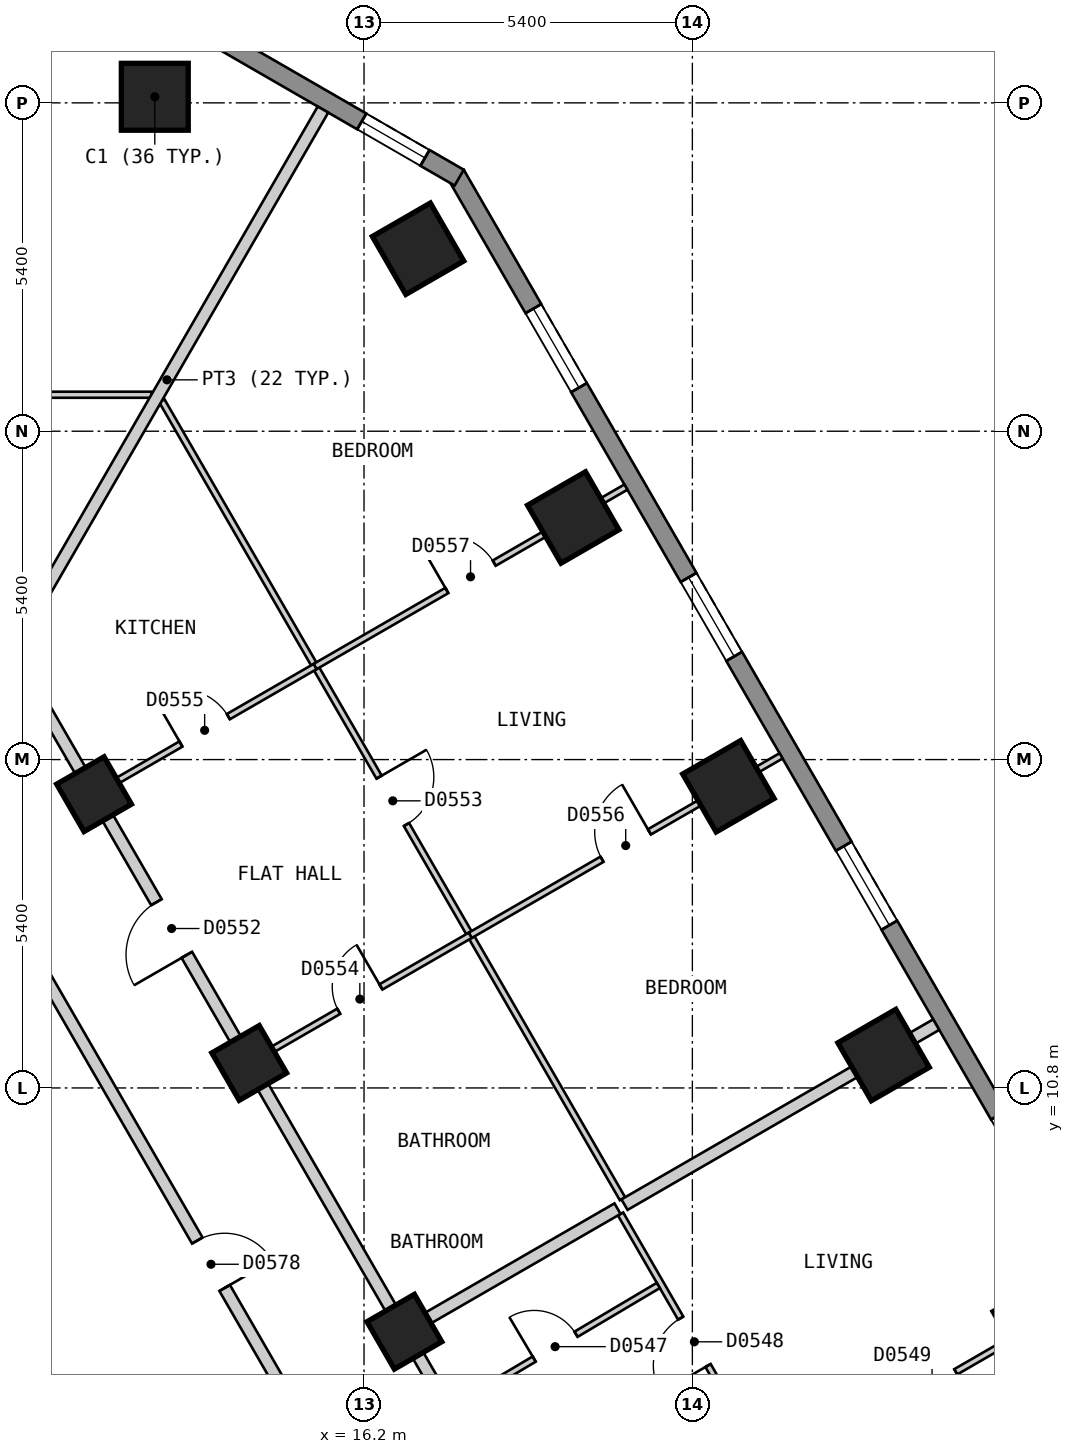
"""IFC4 building model, lengths in metres.
Left out: names, types, materials, properties, quantities, classifications, styles, units other than length and angle.
Written with IfcOpenShell. Run it as: python <this file> out.ifc"""

import sys

from ifc_helpers import new_model, si_unit, direction, frame, frame_2d, origin, origin_2d, place, context, subcontext, project, spatial, polyline, rectangle, outline, extrude, element, fill, save


model = new_model("IFC4")
c1 = context("Model", 3, precision=1e-05, world=origin(), true_north=direction((0.0, 1.0)))
c2 = subcontext(c1, "Body", "Model", "MODEL_VIEW")
j1 = project(units=[si_unit("LENGTHUNIT", "METRE"), si_unit("PLANEANGLEUNIT", "RADIAN")], contexts=[c1])
p1 = place(None, origin())
s1 = spatial("IfcSite", under=j1, at=p1, CompositionType="ELEMENT")
p2 = place(p1, origin())
s2 = spatial("IfcBuilding", under=s1, at=p2, CompositionType="ELEMENT")
p3 = place(p2, frame((0.0, 0.0, 50.4)))
s3 = spatial("IfcBuildingStorey", under=s2, at=p3, CompositionType="ELEMENT", Elevation=50.4)
for number, where, z_axis, x_axis in (
    (1, (12.759, 27.1, 0.0), (0.0, 0.0, 1.0), (-1.0, 0.0, 0.0)),
    (2, (27.297, 6.921, 0.0), (0.0, 0.0, 1.0), (-0.5, 0.866, 0.0)),
    (3, (24.745, 11.341, 0.0), (0.0, 0.0, 1.0), (-0.5, 0.866, 0.0)),
    (4, (22.193, 15.761, 0.0), (0.0, 0.0, 1.0), (-0.5, 0.866, 0.0)),
    (5, (19.641, 20.181, 0.0), (0.0, 0.0, 1.0), (-0.5, 0.866, 0.0)),
    (6, (17.089, 24.601, 0.0), (0.0, 0.0, 1.0), (-0.5, 0.866, 0.0)),
):
    element("IfcColumn", number, at=place(p3, frame(where, z_axis=z_axis, x_axis=x_axis)), inside=s3, PredefinedType="COLUMN", context=c2, shape_type="SweptSolid", body=[
        extrude(rectangle(XDim=1.1, YDim=1.1, at=origin_2d()), origin(), (0.0, 0.0, 1.0), 3.0),
    ])
for number, where, z_axis, x_axis in (
    (7, (16.864, 6.791, 0.0), (0.0, 0.0, 1.0), (-0.5, 0.866, 0.0)),
    (8, (14.312, 11.211, 0.0), (0.0, 0.0, 1.0), (-0.5, 0.866, 0.0)),
    (9, (11.76, 15.631, 0.0), (0.0, 0.0, 1.0), (-0.5, 0.866, 0.0)),
):
    element("IfcColumn", number, at=place(p3, frame(where, z_axis=z_axis, x_axis=x_axis)), inside=s3, PredefinedType="COLUMN", context=c2, shape_type="SweptSolid", body=[
        extrude(rectangle(XDim=0.9, YDim=0.9, at=origin_2d()), origin(), (0.0, 0.0, 1.0), 3.0),
    ])
p4 = place(p3, frame((31.22, 2.425, 0.0), z_axis=(0.0, 0.0, 1.0), x_axis=(-0.500001938803, 0.866024284413, 0.0)))
e10 = element("IfcWall", 10, at=p4, inside=s3, PredefinedType="SOLIDWALL", context=c2, shape_type="SweptSolid", body=[
    extrude(outline(polyline([(0.0, -0.15), (27.02, -0.15), (26.94, 0.15), (0.08, 0.15), (0.0, -0.15)])), origin(), (0.0, 0.0, 1.0), 2.7),
])
p5 = place(p4, frame((2.553, 0.0, 0.15)))
e11 = element("IfcOpeningElement", 11, at=p5, cuts=e10, PredefinedType="OPENING", context=c2, shape_type="SweptSolid", body=[
    extrude(rectangle(XDim=1.5, YDim=2.1, at=frame_2d((0.75, 1.05))), frame((0.0, 0.16, 0.0), z_axis=(0.0, -1.0, 0.0), x_axis=(1.0, 0.0, 0.0)), (0.0, 0.0, 1.0), 0.32),
])
p6 = place(p4, frame((7.657, 0.0, 0.15)))
e12 = element("IfcOpeningElement", 12, at=p6, cuts=e10, PredefinedType="OPENING", context=c2, shape_type="SweptSolid", body=[
    extrude(rectangle(XDim=1.5, YDim=2.1, at=frame_2d((0.75, 1.05))), frame((0.0, 0.16, 0.0), z_axis=(0.0, -1.0, 0.0), x_axis=(1.0, 0.0, 0.0)), (0.0, 0.0, 1.0), 0.32),
])
p7 = place(p4, frame((12.761, 0.0, 0.15)))
e13 = element("IfcOpeningElement", 13, at=p7, cuts=e10, PredefinedType="OPENING", context=c2, shape_type="SweptSolid", body=[
    extrude(rectangle(XDim=1.5, YDim=2.1, at=frame_2d((0.75, 1.05))), frame((0.0, 0.16, 0.0), z_axis=(0.0, -1.0, 0.0), x_axis=(1.0, 0.0, 0.0)), (0.0, 0.0, 1.0), 0.32),
])
p8 = place(p4, frame((17.865, 0.0, 0.15)))
e14 = element("IfcOpeningElement", 14, at=p8, cuts=e10, PredefinedType="OPENING", context=c2, shape_type="SweptSolid", body=[
    extrude(rectangle(XDim=1.5, YDim=2.1, at=frame_2d((0.75, 1.05))), frame((0.0, 0.16, 0.0), z_axis=(0.0, -1.0, 0.0), x_axis=(1.0, 0.0, 0.0)), (0.0, 0.0, 1.0), 0.32),
])
p9 = place(p4, frame((22.969, 0.0, 0.15)))
e15 = element("IfcOpeningElement", 15, at=p9, cuts=e10, PredefinedType="OPENING", context=c2, shape_type="SweptSolid", body=[
    extrude(rectangle(XDim=1.5, YDim=2.1, at=frame_2d((0.75, 1.05))), frame((0.0, 0.16, 0.0), z_axis=(0.0, -1.0, 0.0), x_axis=(1.0, 0.0, 0.0)), (0.0, 0.0, 1.0), 0.32),
])
p10 = place(p3, frame((17.765, 25.77, 0.0), z_axis=(0.0, 0.0, 1.0), x_axis=(-0.866010750942, 0.50002537861, 0.0)))
e16 = element("IfcWall", 16, at=p10, inside=s3, PredefinedType="SOLIDWALL", context=c2, shape_type="SweptSolid", body=[
    extrude(outline(polyline([(0.0, -0.15), (5.0, -0.15), (4.919, 0.15), (0.08, 0.15), (0.0, -0.15)])), origin(), (0.0, 0.0, 1.0), 2.7),
])
p11 = place(p10, frame((0.65, 0.0, 0.15)))
e17 = element("IfcOpeningElement", 17, at=p11, cuts=e16, PredefinedType="OPENING", context=c2, shape_type="SweptSolid", body=[
    extrude(rectangle(XDim=1.2, YDim=2.1, at=frame_2d((0.6, 1.05))), frame((0.0, 0.16, 0.0), z_axis=(0.0, -1.0, 0.0), x_axis=(1.0, 0.0, 0.0)), (0.0, 0.0, 1.0), 0.32),
])
p12 = place(p3, frame((9.18, 15.7, 0.0), z_axis=(0.0, 0.0, 1.0), x_axis=(0.500003652032, -0.866023295272, 0.0)))
e18 = element("IfcWall", 18, at=p12, inside=s3, PredefinedType="PARTITIONING", context=c2, shape_type="SweptSolid", body=[
    extrude(rectangle(XDim=18.012, YDim=0.2, at=frame_2d((9.006, 0.0))), origin(), (0.0, 0.0, 1.0), 2.7),
])
p13 = place(p12, frame((8.556, 0.0, 0.0)))
e19 = element("IfcOpeningElement", 19, at=p13, cuts=e18, PredefinedType="OPENING", context=c2, shape_type="SweptSolid", body=[
    extrude(rectangle(XDim=0.9, YDim=2.1, at=frame_2d((0.45, 1.05))), frame((0.0, 0.11, 0.0), z_axis=(0.0, -1.0, 0.0), x_axis=(1.0, 0.0, 0.0)), (0.0, 0.0, 1.0), 0.22),
])
p14 = place(p3, frame((10.45, 17.9, 0.0), z_axis=(0.0, 0.0, 1.0), x_axis=(0.500034352617, -0.866005569383, 0.0)))
e20 = element("IfcWall", 20, at=p14, inside=s3, PredefinedType="PARTITIONING", context=c2, shape_type="SweptSolid", body=[
    extrude(rectangle(XDim=20.553, YDim=0.2, at=frame_2d((10.276, 0.0))), origin(), (0.0, 0.0, 1.0), 2.7),
])
p15 = place(p14, frame((14.902, 0.0, 0.0)))
e21 = element("IfcOpeningElement", 21, at=p15, cuts=e20, PredefinedType="OPENING", context=c2, shape_type="SweptSolid", body=[
    extrude(rectangle(XDim=1.0, YDim=2.1, at=frame_2d((0.5, 1.05))), frame((0.0, 0.11, 0.0), z_axis=(0.0, -1.0, 0.0), x_axis=(1.0, 0.0, 0.0)), (0.0, 0.0, 1.0), 0.22),
])
p16 = place(p14, frame((4.671, 0.0, 0.0)))
e22 = element("IfcOpeningElement", 22, at=p16, cuts=e20, PredefinedType="OPENING", context=c2, shape_type="SweptSolid", body=[
    extrude(rectangle(XDim=1.0, YDim=2.1, at=frame_2d((0.5, 1.05))), frame((0.0, 0.11, 0.0), z_axis=(0.0, -1.0, 0.0), x_axis=(1.0, 0.0, 0.0)), (0.0, 0.0, 1.0), 0.22),
])
p17 = place(p3, frame((20.419, 8.728, 0.0), z_axis=(0.0, 0.0, 1.0), x_axis=(0.499958946799, -0.866049104564, 0.0)))
e23 = element("IfcWall", 23, at=p17, inside=s3, PredefinedType="PARTITIONING", context=c2, shape_type="SweptSolid", body=[
    extrude(rectangle(XDim=5.004, YDim=0.1, at=frame_2d((2.502, 0.0))), origin(), (0.0, 0.0, 1.0), 2.7),
])
p18 = place(p17, frame((1.978, 0.0, 0.0)))
e24 = element("IfcOpeningElement", 24, at=p18, cuts=e23, PredefinedType="OPENING", context=c2, shape_type="SweptSolid", body=[
    extrude(rectangle(XDim=0.9, YDim=2.1, at=frame_2d((0.45, 1.05))), frame((0.0, 0.06, 0.0), z_axis=(0.0, -1.0, 0.0), x_axis=(1.0, 0.0, 0.0)), (0.0, 0.0, 1.0), 0.12),
])
p19 = place(p3, frame((12.875, 22.1, 0.0), z_axis=(0.0, 0.0, 1.0), x_axis=(0.499994897061, -0.866028349948, 0.0)))
e25 = element("IfcWall", 25, at=p19, inside=s3, PredefinedType="PARTITIONING", context=c2, shape_type="SweptSolid", body=[
    extrude(rectangle(XDim=15.152, YDim=0.1, at=frame_2d((7.576, 0.0))), origin(), (0.0, 0.0, 1.0), 2.7),
])
p20 = place(p19, frame((7.146, 0.0, 0.0)))
e26 = element("IfcOpeningElement", 26, at=p20, cuts=e25, PredefinedType="OPENING", context=c2, shape_type="SweptSolid", body=[
    extrude(rectangle(XDim=0.9, YDim=2.1, at=frame_2d((0.45, 1.05))), frame((0.0, 0.06, 0.0), z_axis=(0.0, -1.0, 0.0), x_axis=(1.0, 0.0, 0.0)), (0.0, 0.0, 1.0), 0.12),
])
p21 = place(p3, frame((-2.453, 22.2, 0.0), z_axis=(0.0, 0.0, 1.0), x_axis=(1.0, 0.0, 0.0)))
e27 = element("IfcWall", 27, at=p21, inside=s3, PredefinedType="PARTITIONING", context=c2, shape_type="SweptSolid", body=[
    extrude(rectangle(XDim=15.155, YDim=0.1, at=frame_2d((7.577, 0.0))), origin(), (0.0, 0.0, 1.0), 2.7),
])
p22 = place(p21, frame((7.106, 0.0, 0.0)))
e28 = element("IfcOpeningElement", 28, at=p22, cuts=e27, PredefinedType="OPENING", context=c2, shape_type="SweptSolid", body=[
    extrude(rectangle(XDim=0.9, YDim=2.1, at=frame_2d((0.45, 1.05))), frame((0.0, 0.06, 0.0), z_axis=(0.0, -1.0, 0.0), x_axis=(1.0, 0.0, 0.0)), (0.0, 0.0, 1.0), 0.12),
])
p23 = place(p3, frame((19.503, 2.421, 0.0), z_axis=(0.0, 0.0, 1.0), x_axis=(0.866065245018, 0.499930986609, 0.0)))
e29 = element("IfcWall", 29, at=p23, inside=s3, PredefinedType="PARTITIONING", context=c2, shape_type="SweptSolid", body=[
    extrude(rectangle(XDim=10.0, YDim=0.1, at=frame_2d((5.0, 0.0))), origin(), (0.0, 0.0, 1.0), 2.7),
])
p24 = place(p23, frame((6.523, 0.0, 0.0)))
e30 = element("IfcOpeningElement", 30, at=p24, cuts=e29, PredefinedType="OPENING", context=c2, shape_type="SweptSolid", body=[
    extrude(rectangle(XDim=0.9, YDim=2.1, at=frame_2d((0.45, 1.05))), frame((0.0, 0.06, 0.0), z_axis=(0.0, -1.0, 0.0), x_axis=(1.0, 0.0, 0.0)), (0.0, 0.0, 1.0), 0.12),
])
p25 = place(p3, frame((11.847, 15.681, 0.0), z_axis=(0.0, 0.0, 1.0), x_axis=(0.865980278416, 0.500078151287, 0.0)))
e31 = element("IfcWall", 31, at=p25, inside=s3, PredefinedType="PARTITIONING", context=c2, shape_type="SweptSolid", body=[
    extrude(rectangle(XDim=4.099, YDim=0.1, at=frame_2d((2.05, 0.0))), origin(), (0.0, 0.0, 1.0), 2.7),
])
p26 = place(p25, frame((1.55, 0.0, 0.0)))
e32 = element("IfcOpeningElement", 32, at=p26, cuts=e31, PredefinedType="OPENING", context=c2, shape_type="SweptSolid", body=[
    extrude(rectangle(XDim=0.9, YDim=2.1, at=frame_2d((0.45, 1.05))), frame((0.0, 0.06, 0.0), z_axis=(0.0, -1.0, 0.0), x_axis=(1.0, 0.0, 0.0)), (0.0, 0.0, 1.0), 0.12),
])
p27 = place(p3, frame((14.399, 11.261, 0.0), z_axis=(0.0, 0.0, 1.0), x_axis=(0.865980278416, 0.500078151287, 0.0)))
e33 = element("IfcWall", 33, at=p27, inside=s3, PredefinedType="PARTITIONING", context=c2, shape_type="SweptSolid", body=[
    extrude(rectangle(XDim=4.099, YDim=0.1, at=frame_2d((2.05, 0.0))), origin(), (0.0, 0.0, 1.0), 2.7),
])
p28 = place(p27, frame((1.6, 0.0, 0.0)))
e34 = element("IfcOpeningElement", 34, at=p28, cuts=e33, PredefinedType="OPENING", context=c2, shape_type="SweptSolid", body=[
    extrude(rectangle(XDim=0.8, YDim=2.1, at=frame_2d((0.4, 1.05))), frame((0.0, 0.06, 0.0), z_axis=(0.0, -1.0, 0.0), x_axis=(1.0, 0.0, 0.0)), (0.0, 0.0, 1.0), 0.12),
])
p29 = place(p3, frame((17.688, 5.564, 0.0), z_axis=(0.0, 0.0, 1.0), x_axis=(0.860107296662, 0.510113162179, 0.0)))
e35 = element("IfcWall", 35, at=p29, inside=s3, PredefinedType="PARTITIONING", context=c2, shape_type="SweptSolid", body=[
    extrude(rectangle(XDim=3.897, YDim=0.1, at=frame_2d((1.949, 0.0))), origin(), (0.0, 0.0, 1.0), 2.7),
])
p30 = place(p29, frame((1.524, 0.0, 0.0)))
e36 = element("IfcOpeningElement", 36, at=p30, cuts=e35, PredefinedType="OPENING", context=c2, shape_type="SweptSolid", body=[
    extrude(rectangle(XDim=0.8, YDim=2.1, at=frame_2d((0.4, 1.05))), frame((0.0, 0.06, 0.0), z_axis=(0.0, -1.0, 0.0), x_axis=(1.0, 0.0, 0.0)), (0.0, 0.0, 1.0), 0.12),
])
p31 = place(p3, frame((10.393, 18.0, 0.0), z_axis=(0.0, 0.0, 1.0), x_axis=(0.499945497007, 0.866056868816, 0.0)))
e37 = element("IfcWall", 37, at=p31, inside=s3, PredefinedType="PARTITIONING", context=c2, shape_type="SweptSolid", body=[
    extrude(rectangle(XDim=10.265, YDim=0.2, at=frame_2d((5.132, 0.0))), origin(), (0.0, 0.0, 1.0), 2.7),
])
p32 = place(p3, frame((16.95, 6.841, 0.0), z_axis=(0.0, 0.0, 1.0), x_axis=(0.866031112038, 0.499990112884, 0.0)))
e38 = element("IfcWall", 38, at=p32, inside=s3, PredefinedType="PARTITIONING", context=c2, shape_type="SweptSolid", body=[
    extrude(rectangle(XDim=3.948, YDim=0.2, at=frame_2d((1.974, 0.0))), origin(), (0.0, 0.0, 1.0), 2.7),
])
p33 = place(p3, frame((20.484, 8.881, 0.0), z_axis=(0.0, 0.0, 1.0), x_axis=(0.866000821391, 0.500042575537, 0.0)))
e39 = element("IfcWall", 39, at=p33, inside=s3, PredefinedType="PARTITIONING", context=c2, shape_type="SweptSolid", body=[
    extrude(rectangle(XDim=5.919, YDim=0.2, at=frame_2d((2.96, 0.0))), origin(), (0.0, 0.0, 1.0), 2.7),
])
p34 = place(p3, frame((15.397, 17.731, 0.0), z_axis=(0.0, 0.0, 1.0), x_axis=(0.866052608538, 0.499952877023, 0.0)))
e40 = element("IfcWall", 40, at=p34, inside=s3, PredefinedType="PARTITIONING", context=c2, shape_type="SweptSolid", body=[
    extrude(rectangle(XDim=5.9, YDim=0.1, at=frame_2d((2.95, 0.0))), origin(), (0.0, 0.0, 1.0), 2.7),
])
p35 = place(p34, frame((2.5, 0.0, 0.0)))
e41 = element("IfcOpeningElement", 41, at=p35, cuts=e40, PredefinedType="OPENING", context=c2, shape_type="SweptSolid", body=[
    extrude(rectangle(XDim=0.9, YDim=2.1, at=frame_2d((0.45, 1.05))), frame((0.0, 0.06, 0.0), z_axis=(0.0, -1.0, 0.0), x_axis=(1.0, 0.0, 0.0)), (0.0, 0.0, 1.0), 0.12),
])
p36 = place(p3, frame((17.949, 13.311, 0.0), z_axis=(0.0, 0.0, 1.0), x_axis=(0.866052608538, 0.499952877023, 0.0)))
e42 = element("IfcWall", 42, at=p36, inside=s3, PredefinedType="PARTITIONING", context=c2, shape_type="SweptSolid", body=[
    extrude(rectangle(XDim=5.9, YDim=0.1, at=frame_2d((2.95, 0.0))), origin(), (0.0, 0.0, 1.0), 2.7),
])
p37 = place(p36, frame((2.5, 0.0, 0.0)))
e43 = element("IfcOpeningElement", 43, at=p37, cuts=e42, PredefinedType="OPENING", context=c2, shape_type="SweptSolid", body=[
    extrude(rectangle(XDim=0.9, YDim=2.1, at=frame_2d((0.45, 1.05))), frame((0.0, 0.06, 0.0), z_axis=(0.0, -1.0, 0.0), x_axis=(1.0, 0.0, 0.0)), (0.0, 0.0, 1.0), 0.12),
])
p38 = place(p7, origin())
e44 = element("IfcWindow", 44, at=p38, inside=s3, PartitioningType="SINGLE_PANEL", PredefinedType="WINDOW", context=c2, shape_type="SweptSolid", body=[
    extrude(rectangle(XDim=1.5, YDim=2.1, at=frame_2d((0.75, 1.05))), frame((0.0, 0.03, 0.0), z_axis=(0.0, -1.0, 0.0), x_axis=(1.0, 0.0, 0.0)), (0.0, 0.0, 1.0), 0.06),
])
fill(e13, e44)
p39 = place(p8, origin())
e45 = element("IfcWindow", 45, at=p39, inside=s3, PartitioningType="SINGLE_PANEL", PredefinedType="WINDOW", context=c2, shape_type="SweptSolid", body=[
    extrude(rectangle(XDim=1.5, YDim=2.1, at=frame_2d((0.75, 1.05))), frame((0.0, 0.03, 0.0), z_axis=(0.0, -1.0, 0.0), x_axis=(1.0, 0.0, 0.0)), (0.0, 0.0, 1.0), 0.06),
])
fill(e14, e45)
p40 = place(p9, origin())
e46 = element("IfcWindow", 46, at=p40, inside=s3, PartitioningType="SINGLE_PANEL", PredefinedType="WINDOW", context=c2, shape_type="SweptSolid", body=[
    extrude(rectangle(XDim=1.5, YDim=2.1, at=frame_2d((0.75, 1.05))), frame((0.0, 0.03, 0.0), z_axis=(0.0, -1.0, 0.0), x_axis=(1.0, 0.0, 0.0)), (0.0, 0.0, 1.0), 0.06),
])
fill(e15, e46)
p41 = place(p11, origin())
e47 = element("IfcWindow", 47, at=p41, inside=s3, PartitioningType="SINGLE_PANEL", PredefinedType="WINDOW", context=c2, shape_type="SweptSolid", body=[
    extrude(rectangle(XDim=1.2, YDim=2.1, at=frame_2d((0.6, 1.05))), frame((0.0, 0.03, 0.0), z_axis=(0.0, -1.0, 0.0), x_axis=(1.0, 0.0, 0.0)), (0.0, 0.0, 1.0), 0.06),
])
fill(e17, e47)
p42 = place(p30, origin())
e48 = element("IfcDoor", 48, at=p42, inside=s3, OperationType="SINGLE_SWING_LEFT", PredefinedType="DOOR", context=c2, shape_type="SweptSolid", body=[
    extrude(rectangle(XDim=0.8, YDim=2.1, at=frame_2d((0.4, 1.05))), frame((0.0, 0.025, 0.0), z_axis=(0.0, -1.0, 0.0), x_axis=(1.0, 0.0, 0.0)), (0.0, 0.0, 1.0), 0.05),
])
fill(e36, e48)
p43 = place(p18, origin())
e49 = element("IfcDoor", 49, at=p43, inside=s3, OperationType="SINGLE_SWING_RIGHT", PredefinedType="DOOR", context=c2, shape_type="SweptSolid", body=[
    extrude(rectangle(XDim=0.9, YDim=2.1, at=frame_2d((0.45, 1.05))), frame((0.0, 0.025, 0.0), z_axis=(0.0, -1.0, 0.0), x_axis=(1.0, 0.0, 0.0)), (0.0, 0.0, 1.0), 0.05),
])
fill(e24, e49)
p44 = place(p24, origin())
e50 = element("IfcDoor", 50, at=p44, inside=s3, OperationType="SINGLE_SWING_LEFT", PredefinedType="DOOR", context=c2, shape_type="SweptSolid", body=[
    extrude(rectangle(XDim=0.9, YDim=2.1, at=frame_2d((0.45, 1.05))), frame((0.0, 0.025, 0.0), z_axis=(0.0, -1.0, 0.0), x_axis=(1.0, 0.0, 0.0)), (0.0, 0.0, 1.0), 0.05),
])
fill(e30, e50)
p45 = place(p16, origin())
e51 = element("IfcDoor", 51, at=p45, inside=s3, OperationType="SINGLE_SWING_RIGHT", PredefinedType="DOOR", context=c2, shape_type="SweptSolid", body=[
    extrude(rectangle(XDim=1.0, YDim=2.1, at=frame_2d((0.5, 1.05))), frame((0.0, 0.025, 0.0), z_axis=(0.0, -1.0, 0.0), x_axis=(1.0, 0.0, 0.0)), (0.0, 0.0, 1.0), 0.05),
])
fill(e22, e51)
p46 = place(p20, origin())
e52 = element("IfcDoor", 52, at=p46, inside=s3, OperationType="SINGLE_SWING_LEFT", PredefinedType="DOOR", context=c2, shape_type="SweptSolid", body=[
    extrude(rectangle(XDim=0.9, YDim=2.1, at=frame_2d((0.45, 1.05))), frame((0.0, 0.025, 0.0), z_axis=(0.0, -1.0, 0.0), x_axis=(1.0, 0.0, 0.0)), (0.0, 0.0, 1.0), 0.05),
])
fill(e26, e52)
p47 = place(p28, origin())
e53 = element("IfcDoor", 53, at=p47, inside=s3, OperationType="SINGLE_SWING_RIGHT", PredefinedType="DOOR", context=c2, shape_type="SweptSolid", body=[
    extrude(rectangle(XDim=0.8, YDim=2.1, at=frame_2d((0.4, 1.05))), frame((0.0, 0.025, 0.0), z_axis=(0.0, -1.0, 0.0), x_axis=(1.0, 0.0, 0.0)), (0.0, 0.0, 1.0), 0.05),
])
fill(e34, e53)
p48 = place(p26, origin())
e54 = element("IfcDoor", 54, at=p48, inside=s3, OperationType="SINGLE_SWING_LEFT", PredefinedType="DOOR", context=c2, shape_type="SweptSolid", body=[
    extrude(rectangle(XDim=0.9, YDim=2.1, at=frame_2d((0.45, 1.05))), frame((0.0, 0.025, 0.0), z_axis=(0.0, -1.0, 0.0), x_axis=(1.0, 0.0, 0.0)), (0.0, 0.0, 1.0), 0.05),
])
fill(e32, e54)
p49 = place(p37, origin())
e55 = element("IfcDoor", 55, at=p49, inside=s3, OperationType="SINGLE_SWING_RIGHT", PredefinedType="DOOR", context=c2, shape_type="SweptSolid", body=[
    extrude(rectangle(XDim=0.9, YDim=2.1, at=frame_2d((0.45, 1.05))), frame((0.0, 0.025, 0.0), z_axis=(0.0, -1.0, 0.0), x_axis=(1.0, 0.0, 0.0)), (0.0, 0.0, 1.0), 0.05),
])
fill(e43, e55)
p50 = place(p35, origin())
e56 = element("IfcDoor", 56, at=p50, inside=s3, OperationType="SINGLE_SWING_LEFT", PredefinedType="DOOR", context=c2, shape_type="SweptSolid", body=[
    extrude(rectangle(XDim=0.9, YDim=2.1, at=frame_2d((0.45, 1.05))), frame((0.0, 0.025, 0.0), z_axis=(0.0, -1.0, 0.0), x_axis=(1.0, 0.0, 0.0)), (0.0, 0.0, 1.0), 0.05),
])
fill(e41, e56)
p51 = place(p13, origin())
e57 = element("IfcDoor", 57, at=p51, inside=s3, OperationType="SINGLE_SWING_RIGHT", PredefinedType="DOOR", context=c2, shape_type="SweptSolid", body=[
    extrude(rectangle(XDim=0.9, YDim=2.1, at=frame_2d((0.45, 1.05))), frame((0.0, 0.025, 0.0), z_axis=(0.0, -1.0, 0.0), x_axis=(1.0, 0.0, 0.0)), (0.0, 0.0, 1.0), 0.05),
])
fill(e19, e57)
save(model, sys.argv[1])
